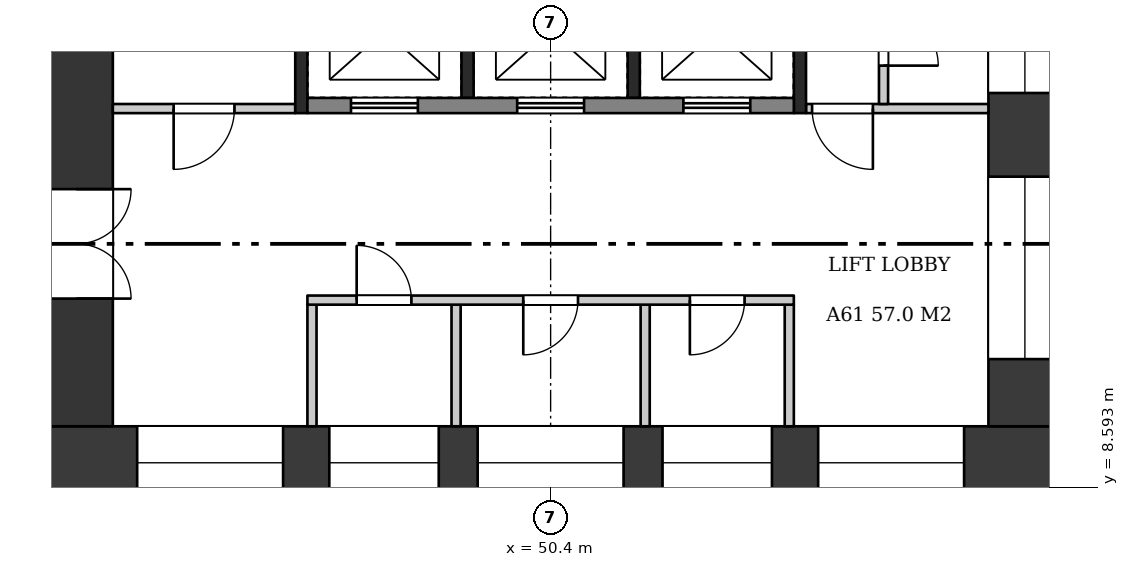
"""IFC4 building model, lengths in metres.
Left out: names, types, materials, properties, quantities, classifications, styles, units other than length and angle.
Written with IfcOpenShell. Run it as: python <this file> out.ifc"""

import sys

from ifc_helpers import new_model, si_unit, direction, frame, frame_2d, origin, place, context, subcontext, project, spatial, rectangle, extrude, element, fill, save


model = new_model("IFC4")
c1 = context("Model", 3, precision=1e-05, world=origin(), true_north=direction((0.0, 1.0)))
c2 = subcontext(c1, "Body", "Model", "MODEL_VIEW")
j1 = project(units=[si_unit("LENGTHUNIT", "METRE"), si_unit("PLANEANGLEUNIT", "RADIAN")], contexts=[c1])
p1 = place(None, origin())
s1 = spatial("IfcSite", under=j1, at=p1, CompositionType="ELEMENT")
p2 = place(p1, origin())
s2 = spatial("IfcBuilding", under=s1, at=p2, CompositionType="ELEMENT")
p3 = place(p2, frame((0.0, 0.0, 235.2)))
s3 = spatial("IfcBuildingStorey", under=s2, at=p3, CompositionType="ELEMENT", Elevation=235.2)
p4 = place(p3, frame((42.0, 9.0, 0.0), z_axis=(0.0, 0.0, 1.0), x_axis=(1.0, 0.0, 0.0)))
e1 = element("IfcWall", 1, at=p4, inside=s3, PredefinedType="SHEAR", context=c2, shape_type="SweptSolid", body=[
    extrude(rectangle(XDim=16.8, YDim=1.2, at=frame_2d((8.4, 0.0))), origin(), (0.0, 0.0, 1.0), 3.22),
])
p5 = place(p4, frame((1.6, 0.0, 0.6)))
e2 = element("IfcOpeningElement", 2, at=p5, cuts=e1, PredefinedType="OPENING", context=c2, shape_type="SweptSolid", body=[
    extrude(rectangle(XDim=2.4, YDim=2.1, at=frame_2d((1.2, 1.05))), frame((0.0, 0.61, 0.0), z_axis=(0.0, -1.0, 0.0), x_axis=(1.0, 0.0, 0.0)), (0.0, 0.0, 1.0), 1.22),
])
p6 = place(p4, frame((4.76, 0.0, 1.6)))
e3 = element("IfcOpeningElement", 3, at=p6, cuts=e1, PredefinedType="OPENING", context=c2, shape_type="SweptSolid", body=[
    extrude(rectangle(XDim=1.8, YDim=1.2, at=frame_2d((0.9, 0.6))), frame((0.0, 0.61, 0.0), z_axis=(0.0, -1.0, 0.0), x_axis=(1.0, 0.0, 0.0)), (0.0, 0.0, 1.0), 1.22),
])
p7 = place(p4, frame((7.2, 0.0, 1.6)))
e4 = element("IfcOpeningElement", 4, at=p7, cuts=e1, PredefinedType="OPENING", context=c2, shape_type="SweptSolid", body=[
    extrude(rectangle(XDim=2.4, YDim=1.2, at=frame_2d((1.2, 0.6))), frame((0.0, 0.61, 0.0), z_axis=(0.0, -1.0, 0.0), x_axis=(1.0, 0.0, 0.0)), (0.0, 0.0, 1.0), 1.22),
])
p8 = place(p4, frame((10.24, 0.0, 1.6)))
e5 = element("IfcOpeningElement", 5, at=p8, cuts=e1, PredefinedType="OPENING", context=c2, shape_type="SweptSolid", body=[
    extrude(rectangle(XDim=1.8, YDim=1.2, at=frame_2d((0.9, 0.6))), frame((0.0, 0.61, 0.0), z_axis=(0.0, -1.0, 0.0), x_axis=(1.0, 0.0, 0.0)), (0.0, 0.0, 1.0), 1.22),
])
p9 = place(p4, frame((12.8, 0.0, 0.6)))
e6 = element("IfcOpeningElement", 6, at=p9, cuts=e1, PredefinedType="OPENING", context=c2, shape_type="SweptSolid", body=[
    extrude(rectangle(XDim=2.4, YDim=2.1, at=frame_2d((1.2, 1.05))), frame((0.0, 0.61, 0.0), z_axis=(0.0, -1.0, 0.0), x_axis=(1.0, 0.0, 0.0)), (0.0, 0.0, 1.0), 1.22),
])
p10 = place(p3, frame((42.6, 9.6, 0.0), z_axis=(0.0, 0.0, 1.0), x_axis=(0.0, 1.0, 0.0)))
e7 = element("IfcWall", 7, at=p10, inside=s3, PredefinedType="SHEAR", context=c2, shape_type="SweptSolid", body=[
    extrude(rectangle(XDim=14.4, YDim=1.2, at=frame_2d((7.2, 0.0))), origin(), (0.0, 0.0, 1.0), 3.22),
])
p11 = place(p10, frame((2.1, 0.0, 0.0)))
e8 = element("IfcOpeningElement", 8, at=p11, cuts=e7, PredefinedType="OPENING", context=c2, shape_type="SweptSolid", body=[
    extrude(rectangle(XDim=1.8, YDim=2.1, at=frame_2d((0.9, 1.05))), frame((0.0, 0.61, 0.0), z_axis=(0.0, -1.0, 0.0), x_axis=(1.0, 0.0, 0.0)), (0.0, 0.0, 1.0), 1.22),
])
p12 = place(p3, frame((58.2, 9.6, 0.0), z_axis=(0.0, 0.0, 1.0), x_axis=(0.0, 1.0, 0.0)))
e9 = element("IfcWall", 9, at=p12, inside=s3, PredefinedType="SHEAR", context=c2, shape_type="SweptSolid", body=[
    extrude(rectangle(XDim=14.4, YDim=1.2, at=frame_2d((7.2, 0.0))), origin(), (0.0, 0.0, 1.0), 3.22),
])
p13 = place(p12, frame((1.105, 0.0, 0.6)))
e10 = element("IfcOpeningElement", 10, at=p13, cuts=e9, PredefinedType="OPENING", context=c2, shape_type="SweptSolid", body=[
    extrude(rectangle(XDim=3.0, YDim=2.1, at=frame_2d((1.5, 1.05))), frame((0.0, 0.61, 0.0), z_axis=(0.0, -1.0, 0.0), x_axis=(1.0, 0.0, 0.0)), (0.0, 0.0, 1.0), 1.22),
])
p14 = place(p12, frame((5.481, 0.0, 1.6)))
e11 = element("IfcOpeningElement", 11, at=p14, cuts=e9, PredefinedType="OPENING", context=c2, shape_type="SweptSolid", body=[
    extrude(rectangle(XDim=1.8, YDim=1.2, at=frame_2d((0.9, 0.6))), frame((0.0, 0.61, 0.0), z_axis=(0.0, -1.0, 0.0), x_axis=(1.0, 0.0, 0.0)), (0.0, 0.0, 1.0), 1.22),
])
p15 = place(p12, frame((7.794, 0.0, 1.6)))
e12 = element("IfcOpeningElement", 12, at=p15, cuts=e9, PredefinedType="OPENING", context=c2, shape_type="SweptSolid", body=[
    extrude(rectangle(XDim=1.8, YDim=1.2, at=frame_2d((0.9, 0.6))), frame((0.0, 0.61, 0.0), z_axis=(0.0, -1.0, 0.0), x_axis=(1.0, 0.0, 0.0)), (0.0, 0.0, 1.0), 1.22),
])
p16 = place(p12, frame((10.106, 0.0, 1.6)))
e13 = element("IfcOpeningElement", 13, at=p16, cuts=e9, PredefinedType="OPENING", context=c2, shape_type="SweptSolid", body=[
    extrude(rectangle(XDim=1.8, YDim=1.2, at=frame_2d((0.9, 0.6))), frame((0.0, 0.61, 0.0), z_axis=(0.0, -1.0, 0.0), x_axis=(1.0, 0.0, 0.0)), (0.0, 0.0, 1.0), 1.22),
])
p17 = place(p12, frame((12.389, 0.0, 1.6)))
e14 = element("IfcOpeningElement", 14, at=p17, cuts=e9, PredefinedType="OPENING", context=c2, shape_type="SweptSolid", body=[
    extrude(rectangle(XDim=1.8, YDim=1.2, at=frame_2d((0.9, 0.6))), frame((0.0, 0.61, 0.0), z_axis=(0.0, -1.0, 0.0), x_axis=(1.0, 0.0, 0.0)), (0.0, 0.0, 1.0), 1.22),
])
for number, where, z_axis, x_axis in (
    (15, (46.475, 9.6, 0.0), (0.0, 0.0, 1.0), (0.0, 1.0, 0.0)),
    (16, (54.325, 9.6, 0.0), (0.0, 0.0, 1.0), (0.0, 1.0, 0.0)),
    (17, (48.845, 9.6, 0.0), (0.0, 0.0, 1.0), (0.0, 1.0, 0.0)),
    (18, (51.955, 9.6, 0.0), (0.0, 0.0, 1.0), (0.0, 1.0, 0.0)),
):
    element("IfcWall", number, at=place(p3, frame(where, z_axis=z_axis, x_axis=x_axis)), inside=s3, PredefinedType="PARTITIONING", context=c2, shape_type="SweptSolid", body=[
        extrude(rectangle(XDim=2.0, YDim=0.15, at=frame_2d((1.0, 0.0))), origin(), (0.0, 0.0, 1.0), 3.22),
    ])
p18 = place(p3, frame((46.4, 11.675, 0.0), z_axis=(0.0, 0.0, 1.0), x_axis=(1.0, 0.0, 0.0)))
e19 = element("IfcWall", 19, at=p18, inside=s3, PredefinedType="PARTITIONING", context=c2, shape_type="SweptSolid", body=[
    extrude(rectangle(XDim=8.0, YDim=0.15, at=frame_2d((4.0, 0.0))), origin(), (0.0, 0.0, 1.0), 3.22),
])
p19 = place(p18, frame((0.81, 0.0, 0.0)))
e20 = element("IfcOpeningElement", 20, at=p19, cuts=e19, PredefinedType="OPENING", context=c2, shape_type="SweptSolid", body=[
    extrude(rectangle(XDim=0.9, YDim=2.1, at=frame_2d((0.45, 1.05))), frame((0.0, 0.085, 0.0), z_axis=(0.0, -1.0, 0.0), x_axis=(1.0, 0.0, 0.0)), (0.0, 0.0, 1.0), 0.17),
])
p20 = place(p18, frame((3.55, 0.0, 0.0)))
e21 = element("IfcOpeningElement", 21, at=p20, cuts=e19, PredefinedType="OPENING", context=c2, shape_type="SweptSolid", body=[
    extrude(rectangle(XDim=0.9, YDim=2.1, at=frame_2d((0.45, 1.05))), frame((0.0, 0.085, 0.0), z_axis=(0.0, -1.0, 0.0), x_axis=(1.0, 0.0, 0.0)), (0.0, 0.0, 1.0), 0.17),
])
p21 = place(p18, frame((6.29, 0.0, 0.0)))
e22 = element("IfcOpeningElement", 22, at=p21, cuts=e19, PredefinedType="OPENING", context=c2, shape_type="SweptSolid", body=[
    extrude(rectangle(XDim=0.9, YDim=2.1, at=frame_2d((0.45, 1.05))), frame((0.0, 0.085, 0.0), z_axis=(0.0, -1.0, 0.0), x_axis=(1.0, 0.0, 0.0)), (0.0, 0.0, 1.0), 0.17),
])
for number, where, z_axis, x_axis in (
    (23, (49.033, 15.0, 0.0), (0.0, 0.0, 1.0), (0.0, 1.0, 0.0)),
    (24, (51.767, 15.0, 0.0), (0.0, 0.0, 1.0), (0.0, 1.0, 0.0)),
):
    element("IfcWall", number, at=place(p3, frame(where, z_axis=z_axis, x_axis=x_axis)), inside=s3, PredefinedType="SHEAR", context=c2, shape_type="SweptSolid", body=[
        extrude(rectangle(XDim=1.9, YDim=0.2, at=frame_2d((0.95, 0.0))), origin(), (0.0, 0.0, 1.0), 3.22),
    ])
p22 = place(p3, frame((46.4, 14.875, 0.0), z_axis=(0.0, 0.0, 1.0), x_axis=(1.0, 0.0, 0.0)))
e25 = element("IfcWall", 25, at=p22, inside=s3, PredefinedType="SHEAR", context=c2, shape_type="SweptSolid", body=[
    extrude(rectangle(XDim=8.0, YDim=0.25, at=frame_2d((4.0, 0.0))), origin(), (0.0, 0.0, 1.0), 3.22),
])
p23 = place(p22, frame((0.717, 0.0, 0.0)))
e26 = element("IfcOpeningElement", 26, at=p23, cuts=e25, PredefinedType="OPENING", context=c2, shape_type="SweptSolid", body=[
    extrude(rectangle(XDim=1.1, YDim=2.1, at=frame_2d((0.55, 1.05))), frame((0.0, 0.135, 0.0), z_axis=(0.0, -1.0, 0.0), x_axis=(1.0, 0.0, 0.0)), (0.0, 0.0, 1.0), 0.27),
])
p24 = place(p22, frame((3.45, 0.0, 0.0)))
e27 = element("IfcOpeningElement", 27, at=p24, cuts=e25, PredefinedType="OPENING", context=c2, shape_type="SweptSolid", body=[
    extrude(rectangle(XDim=1.1, YDim=2.1, at=frame_2d((0.55, 1.05))), frame((0.0, 0.135, 0.0), z_axis=(0.0, -1.0, 0.0), x_axis=(1.0, 0.0, 0.0)), (0.0, 0.0, 1.0), 0.27),
])
p25 = place(p22, frame((6.183, 0.0, 0.0)))
e28 = element("IfcOpeningElement", 28, at=p25, cuts=e25, PredefinedType="OPENING", context=c2, shape_type="SweptSolid", body=[
    extrude(rectangle(XDim=1.1, YDim=2.1, at=frame_2d((0.55, 1.05))), frame((0.0, 0.135, 0.0), z_axis=(0.0, -1.0, 0.0), x_axis=(1.0, 0.0, 0.0)), (0.0, 0.0, 1.0), 0.27),
])
p26 = place(p3, frame((46.3, 14.75, 0.0), z_axis=(0.0, 0.0, 1.0), x_axis=(0.0, 1.0, 0.0)))
e29 = element("IfcWall", 29, at=p26, inside=s3, PredefinedType="SHEAR", context=c2, shape_type="SweptSolid", body=[
    extrude(rectangle(XDim=2.4, YDim=0.2, at=frame_2d((1.2, 0.0))), origin(), (0.0, 0.0, 1.0), 3.22),
])
p27 = place(p3, frame((43.2, 14.825, 0.0), z_axis=(0.0, 0.0, 1.0), x_axis=(1.0, 0.0, 0.0)))
e30 = element("IfcWall", 30, at=p27, inside=s3, PredefinedType="PARTITIONING", context=c2, shape_type="SweptSolid", body=[
    extrude(rectangle(XDim=3.0, YDim=0.15, at=frame_2d((1.5, 0.0))), origin(), (0.0, 0.0, 1.0), 3.22),
])
p28 = place(p27, frame((1.0, 0.0, 0.0)))
e31 = element("IfcOpeningElement", 31, at=p28, cuts=e30, PredefinedType="OPENING", context=c2, shape_type="SweptSolid", body=[
    extrude(rectangle(XDim=1.0, YDim=2.1, at=frame_2d((0.5, 1.05))), frame((0.0, 0.085, 0.0), z_axis=(0.0, -1.0, 0.0), x_axis=(1.0, 0.0, 0.0)), (0.0, 0.0, 1.0), 0.17),
])
p29 = place(p3, frame((54.5, 14.75, 0.0), z_axis=(0.0, 0.0, 1.0), x_axis=(0.0, 1.0, 0.0)))
e32 = element("IfcWall", 32, at=p29, inside=s3, PredefinedType="SHEAR", context=c2, shape_type="SweptSolid", body=[
    extrude(rectangle(XDim=9.25, YDim=0.2, at=frame_2d((4.625, 0.0))), origin(), (0.0, 0.0, 1.0), 3.22),
])
p30 = place(p3, frame((54.6, 14.825, 0.0), z_axis=(0.0, 0.0, 1.0), x_axis=(1.0, 0.0, 0.0)))
e33 = element("IfcWall", 33, at=p30, inside=s3, PredefinedType="PARTITIONING", context=c2, shape_type="SweptSolid", body=[
    extrude(rectangle(XDim=3.0, YDim=0.15, at=frame_2d((1.5, 0.0))), origin(), (0.0, 0.0, 1.0), 3.22),
])
p31 = place(p30, frame((0.1, 0.0, 0.0)))
e34 = element("IfcOpeningElement", 34, at=p31, cuts=e33, PredefinedType="OPENING", context=c2, shape_type="SweptSolid", body=[
    extrude(rectangle(XDim=1.0, YDim=2.1, at=frame_2d((0.5, 1.05))), frame((0.0, 0.085, 0.0), z_axis=(0.0, -1.0, 0.0), x_axis=(1.0, 0.0, 0.0)), (0.0, 0.0, 1.0), 0.17),
])
p32 = place(p3, frame((55.875, 14.9, 0.0), z_axis=(0.0, 0.0, 1.0), x_axis=(0.0, 1.0, 0.0)))
e35 = element("IfcWall", 35, at=p32, inside=s3, PredefinedType="PARTITIONING", context=c2, shape_type="SweptSolid", body=[
    extrude(rectangle(XDim=9.1, YDim=0.15, at=frame_2d((4.55, 0.0))), origin(), (0.0, 0.0, 1.0), 3.22),
])
p33 = place(p32, frame((0.631, 0.0, 0.0)))
e36 = element("IfcOpeningElement", 36, at=p33, cuts=e35, PredefinedType="OPENING", context=c2, shape_type="SweptSolid", body=[
    extrude(rectangle(XDim=0.9, YDim=2.1, at=frame_2d((0.45, 1.05))), frame((0.0, 0.085, 0.0), z_axis=(0.0, -1.0, 0.0), x_axis=(1.0, 0.0, 0.0)), (0.0, 0.0, 1.0), 0.17),
])
p34 = place(p32, frame((2.944, 0.0, 0.0)))
e37 = element("IfcOpeningElement", 37, at=p34, cuts=e35, PredefinedType="OPENING", context=c2, shape_type="SweptSolid", body=[
    extrude(rectangle(XDim=0.9, YDim=2.1, at=frame_2d((0.45, 1.05))), frame((0.0, 0.085, 0.0), z_axis=(0.0, -1.0, 0.0), x_axis=(1.0, 0.0, 0.0)), (0.0, 0.0, 1.0), 0.17),
])
p35 = place(p32, frame((5.256, 0.0, 0.0)))
e38 = element("IfcOpeningElement", 38, at=p35, cuts=e35, PredefinedType="OPENING", context=c2, shape_type="SweptSolid", body=[
    extrude(rectangle(XDim=0.9, YDim=2.1, at=frame_2d((0.45, 1.05))), frame((0.0, 0.085, 0.0), z_axis=(0.0, -1.0, 0.0), x_axis=(1.0, 0.0, 0.0)), (0.0, 0.0, 1.0), 0.17),
])
p36 = place(p32, frame((7.569, 0.0, 0.0)))
e39 = element("IfcOpeningElement", 39, at=p36, cuts=e35, PredefinedType="OPENING", context=c2, shape_type="SweptSolid", body=[
    extrude(rectangle(XDim=0.9, YDim=2.1, at=frame_2d((0.45, 1.05))), frame((0.0, 0.085, 0.0), z_axis=(0.0, -1.0, 0.0), x_axis=(1.0, 0.0, 0.0)), (0.0, 0.0, 1.0), 0.17),
])
p37 = place(p11, frame((1.8, 0.0, 0.0), z_axis=(0.0, 0.0, 1.0), x_axis=(-1.0, 0.0, 0.0)))
e40 = element("IfcDoor", 40, at=p37, inside=s3, OperationType="DOUBLE_DOOR_SINGLE_SWING", PredefinedType="DOOR", context=c2, shape_type="SweptSolid", body=[
    extrude(rectangle(XDim=1.8, YDim=2.1, at=frame_2d((0.9, 1.05))), frame((0.0, 0.025, 0.0), z_axis=(0.0, -1.0, 0.0), x_axis=(1.0, 0.0, 0.0)), (0.0, 0.0, 1.0), 0.05),
])
fill(e8, e40)
p38 = place(p19, origin())
e41 = element("IfcDoor", 41, at=p38, inside=s3, OperationType="SINGLE_SWING_LEFT", PredefinedType="DOOR", context=c2, shape_type="SweptSolid", body=[
    extrude(rectangle(XDim=0.9, YDim=2.1, at=frame_2d((0.45, 1.05))), frame((0.0, 0.025, 0.0), z_axis=(0.0, -1.0, 0.0), x_axis=(1.0, 0.0, 0.0)), (0.0, 0.0, 1.0), 0.05),
])
fill(e20, e41)
p39 = place(p20, frame((0.9, 0.0, 0.0), z_axis=(0.0, 0.0, 1.0), x_axis=(-1.0, 0.0, 0.0)))
e42 = element("IfcDoor", 42, at=p39, inside=s3, OperationType="SINGLE_SWING_RIGHT", PredefinedType="DOOR", context=c2, shape_type="SweptSolid", body=[
    extrude(rectangle(XDim=0.9, YDim=2.1, at=frame_2d((0.45, 1.05))), frame((0.0, 0.025, 0.0), z_axis=(0.0, -1.0, 0.0), x_axis=(1.0, 0.0, 0.0)), (0.0, 0.0, 1.0), 0.05),
])
fill(e21, e42)
p40 = place(p21, frame((0.9, 0.0, 0.0), z_axis=(0.0, 0.0, 1.0), x_axis=(-1.0, 0.0, 0.0)))
e43 = element("IfcDoor", 43, at=p40, inside=s3, OperationType="SINGLE_SWING_RIGHT", PredefinedType="DOOR", context=c2, shape_type="SweptSolid", body=[
    extrude(rectangle(XDim=0.9, YDim=2.1, at=frame_2d((0.45, 1.05))), frame((0.0, 0.025, 0.0), z_axis=(0.0, -1.0, 0.0), x_axis=(1.0, 0.0, 0.0)), (0.0, 0.0, 1.0), 0.05),
])
fill(e22, e43)
p41 = place(p23, origin())
e44 = element("IfcDoor", 44, at=p41, inside=s3, OperationType="DOUBLE_DOOR_SLIDING", PredefinedType="DOOR", context=c2, shape_type="SweptSolid", body=[
    extrude(rectangle(XDim=1.1, YDim=2.1, at=frame_2d((0.55, 1.05))), frame((0.0, 0.025, 0.0), z_axis=(0.0, -1.0, 0.0), x_axis=(1.0, 0.0, 0.0)), (0.0, 0.0, 1.0), 0.05),
])
fill(e26, e44)
p42 = place(p24, origin())
e45 = element("IfcDoor", 45, at=p42, inside=s3, OperationType="DOUBLE_DOOR_SLIDING", PredefinedType="DOOR", context=c2, shape_type="SweptSolid", body=[
    extrude(rectangle(XDim=1.1, YDim=2.1, at=frame_2d((0.55, 1.05))), frame((0.0, 0.025, 0.0), z_axis=(0.0, -1.0, 0.0), x_axis=(1.0, 0.0, 0.0)), (0.0, 0.0, 1.0), 0.05),
])
fill(e27, e45)
p43 = place(p25, origin())
e46 = element("IfcDoor", 46, at=p43, inside=s3, OperationType="DOUBLE_DOOR_SLIDING", PredefinedType="DOOR", context=c2, shape_type="SweptSolid", body=[
    extrude(rectangle(XDim=1.1, YDim=2.1, at=frame_2d((0.55, 1.05))), frame((0.0, 0.025, 0.0), z_axis=(0.0, -1.0, 0.0), x_axis=(1.0, 0.0, 0.0)), (0.0, 0.0, 1.0), 0.05),
])
fill(e28, e46)
p44 = place(p28, frame((1.0, 0.0, 0.0), z_axis=(0.0, 0.0, 1.0), x_axis=(-1.0, 0.0, 0.0)))
e47 = element("IfcDoor", 47, at=p44, inside=s3, OperationType="SINGLE_SWING_RIGHT", PredefinedType="DOOR", context=c2, shape_type="SweptSolid", body=[
    extrude(rectangle(XDim=1.0, YDim=2.1, at=frame_2d((0.5, 1.05))), frame((0.0, 0.025, 0.0), z_axis=(0.0, -1.0, 0.0), x_axis=(1.0, 0.0, 0.0)), (0.0, 0.0, 1.0), 0.05),
])
fill(e31, e47)
p45 = place(p31, frame((1.0, 0.0, 0.0), z_axis=(0.0, 0.0, 1.0), x_axis=(-1.0, 0.0, 0.0)))
e48 = element("IfcDoor", 48, at=p45, inside=s3, OperationType="SINGLE_SWING_LEFT", PredefinedType="DOOR", context=c2, shape_type="SweptSolid", body=[
    extrude(rectangle(XDim=1.0, YDim=2.1, at=frame_2d((0.5, 1.05))), frame((0.0, 0.025, 0.0), z_axis=(0.0, -1.0, 0.0), x_axis=(1.0, 0.0, 0.0)), (0.0, 0.0, 1.0), 0.05),
])
fill(e34, e48)
p46 = place(p33, frame((0.9, 0.0, 0.0), z_axis=(0.0, 0.0, 1.0), x_axis=(-1.0, 0.0, 0.0)))
e49 = element("IfcDoor", 49, at=p46, inside=s3, OperationType="SINGLE_SWING_RIGHT", PredefinedType="DOOR", context=c2, shape_type="SweptSolid", body=[
    extrude(rectangle(XDim=0.9, YDim=2.1, at=frame_2d((0.45, 1.05))), frame((0.0, 0.025, 0.0), z_axis=(0.0, -1.0, 0.0), x_axis=(1.0, 0.0, 0.0)), (0.0, 0.0, 1.0), 0.05),
])
fill(e36, e49)
p47 = place(p5, origin())
e50 = element("IfcWindow", 50, at=p47, inside=s3, PartitioningType="SINGLE_PANEL", PredefinedType="WINDOW", context=c2, shape_type="SweptSolid", body=[
    extrude(rectangle(XDim=2.4, YDim=2.1, at=frame_2d((1.2, 1.05))), frame((0.0, 0.03, 0.0), z_axis=(0.0, -1.0, 0.0), x_axis=(1.0, 0.0, 0.0)), (0.0, 0.0, 1.0), 0.06),
])
fill(e2, e50)
p48 = place(p6, origin())
e51 = element("IfcWindow", 51, at=p48, inside=s3, PartitioningType="SINGLE_PANEL", PredefinedType="WINDOW", context=c2, shape_type="SweptSolid", body=[
    extrude(rectangle(XDim=1.8, YDim=1.2, at=frame_2d((0.9, 0.6))), frame((0.0, 0.03, 0.0), z_axis=(0.0, -1.0, 0.0), x_axis=(1.0, 0.0, 0.0)), (0.0, 0.0, 1.0), 0.06),
])
fill(e3, e51)
p49 = place(p7, origin())
e52 = element("IfcWindow", 52, at=p49, inside=s3, PartitioningType="SINGLE_PANEL", PredefinedType="WINDOW", context=c2, shape_type="SweptSolid", body=[
    extrude(rectangle(XDim=2.4, YDim=1.2, at=frame_2d((1.2, 0.6))), frame((0.0, 0.03, 0.0), z_axis=(0.0, -1.0, 0.0), x_axis=(1.0, 0.0, 0.0)), (0.0, 0.0, 1.0), 0.06),
])
fill(e4, e52)
p50 = place(p8, origin())
e53 = element("IfcWindow", 53, at=p50, inside=s3, PartitioningType="SINGLE_PANEL", PredefinedType="WINDOW", context=c2, shape_type="SweptSolid", body=[
    extrude(rectangle(XDim=1.8, YDim=1.2, at=frame_2d((0.9, 0.6))), frame((0.0, 0.03, 0.0), z_axis=(0.0, -1.0, 0.0), x_axis=(1.0, 0.0, 0.0)), (0.0, 0.0, 1.0), 0.06),
])
fill(e5, e53)
p51 = place(p9, origin())
e54 = element("IfcWindow", 54, at=p51, inside=s3, PartitioningType="SINGLE_PANEL", PredefinedType="WINDOW", context=c2, shape_type="SweptSolid", body=[
    extrude(rectangle(XDim=2.4, YDim=2.1, at=frame_2d((1.2, 1.05))), frame((0.0, 0.03, 0.0), z_axis=(0.0, -1.0, 0.0), x_axis=(1.0, 0.0, 0.0)), (0.0, 0.0, 1.0), 0.06),
])
fill(e6, e54)
p52 = place(p13, origin())
e55 = element("IfcWindow", 55, at=p52, inside=s3, PartitioningType="SINGLE_PANEL", PredefinedType="WINDOW", context=c2, shape_type="SweptSolid", body=[
    extrude(rectangle(XDim=3.0, YDim=2.1, at=frame_2d((1.5, 1.05))), frame((0.0, 0.03, 0.0), z_axis=(0.0, -1.0, 0.0), x_axis=(1.0, 0.0, 0.0)), (0.0, 0.0, 1.0), 0.06),
])
fill(e10, e55)
p53 = place(p14, origin())
e56 = element("IfcWindow", 56, at=p53, inside=s3, PartitioningType="SINGLE_PANEL", PredefinedType="WINDOW", context=c2, shape_type="SweptSolid", body=[
    extrude(rectangle(XDim=1.8, YDim=1.2, at=frame_2d((0.9, 0.6))), frame((0.0, 0.03, 0.0), z_axis=(0.0, -1.0, 0.0), x_axis=(1.0, 0.0, 0.0)), (0.0, 0.0, 1.0), 0.06),
])
fill(e11, e56)
save(model, sys.argv[1])
